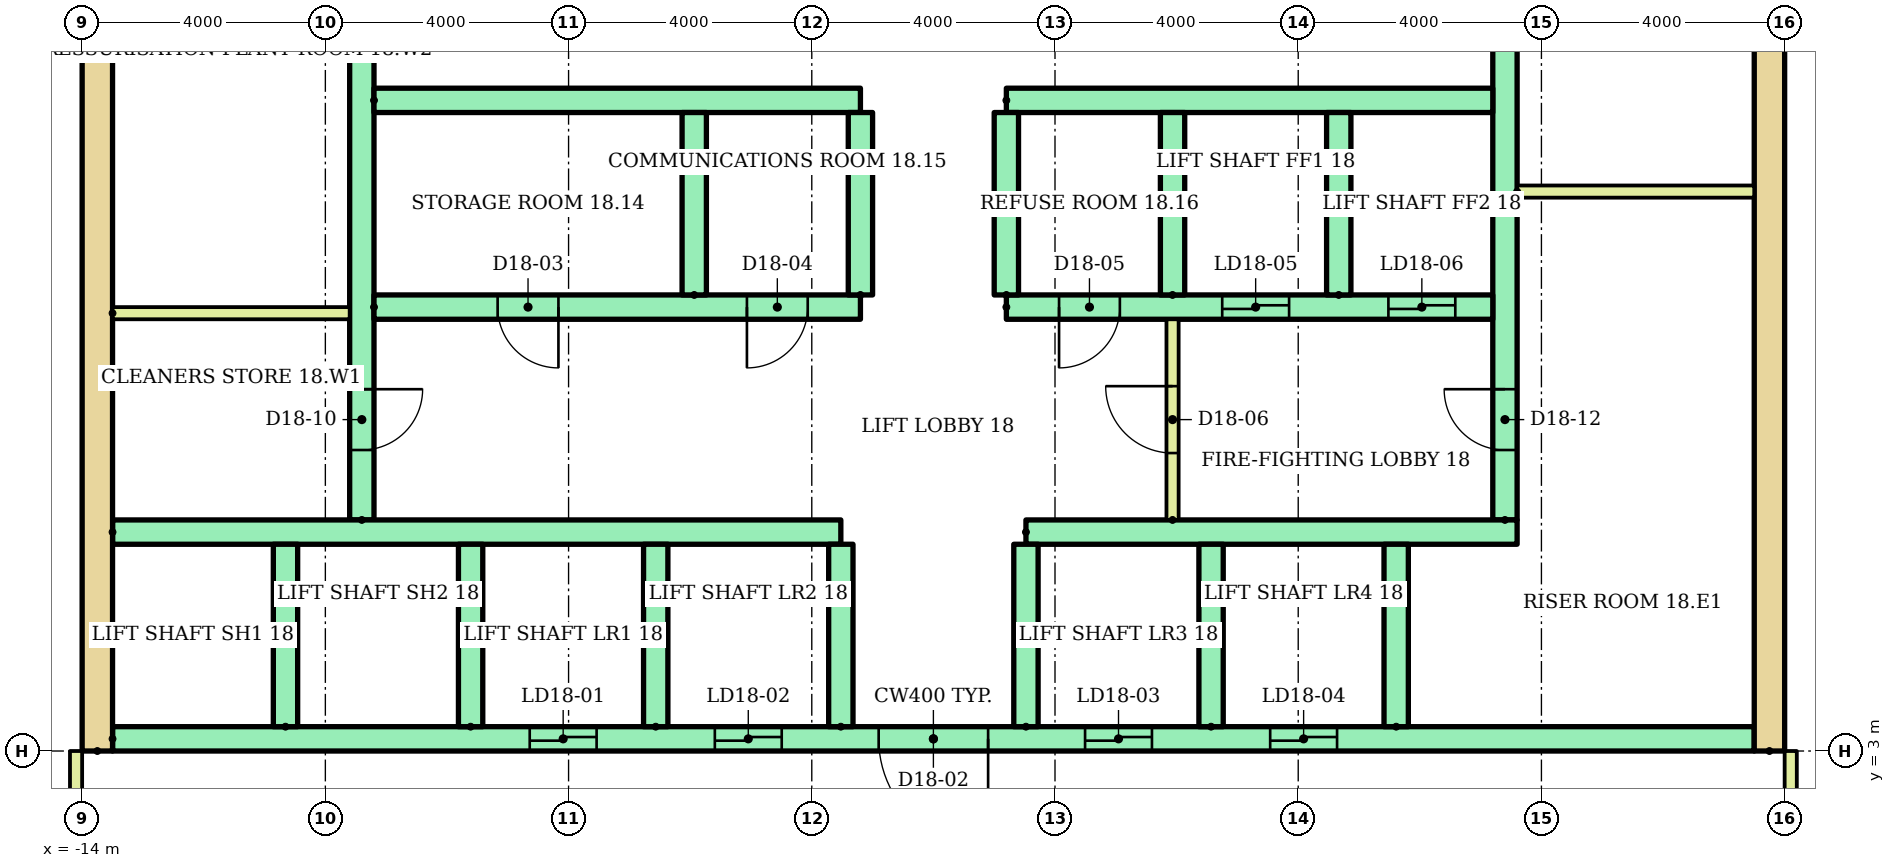
"""IFC4 building model, lengths in metres.
Left out: names, types, materials, properties, quantities, classifications, styles, units other than length and angle.
Written with IfcOpenShell. Run it as: python <this file> out.ifc"""

import sys

from ifc_helpers import new_model, si_unit, direction, frame, frame_2d, origin, place, context, subcontext, project, spatial, rectangle, extrude, element, fill, save


model = new_model("IFC4")
c1 = context("Model", 3, precision=1e-05, world=origin(), true_north=direction((0.0, 1.0)))
c2 = subcontext(c1, "Body", "Model", "MODEL_VIEW")
j1 = project(units=[si_unit("LENGTHUNIT", "METRE"), si_unit("PLANEANGLEUNIT", "RADIAN")], contexts=[c1])
p1 = place(None, origin())
s1 = spatial("IfcSite", under=j1, at=p1, CompositionType="ELEMENT")
p2 = place(p1, origin())
s2 = spatial("IfcBuilding", under=s1, at=p2, CompositionType="ELEMENT")
p3 = place(p2, frame((0.0, 0.0, 73.6)))
s3 = spatial("IfcBuildingStorey", under=s2, at=p3, CompositionType="ELEMENT", Elevation=73.6)
for number, where, z_axis, x_axis in (
    (1, (-13.75, 3.0, 0.0), (0.0, 0.0, 1.0), (0.0, 1.0, 0.0)),
    (2, (13.75, 3.0, 0.0), (0.0, 0.0, 1.0), (0.0, 1.0, 0.0)),
):
    element("IfcWall", number, at=place(p3, frame(where, z_axis=z_axis, x_axis=x_axis)), inside=s3, PredefinedType="SHEAR", context=c2, shape_type="SweptSolid", body=[
        extrude(rectangle(XDim=17.0, YDim=0.5, at=frame_2d((8.5, 0.0))), origin(), (0.0, 0.0, 1.0), 3.62),
    ])
p4 = place(p3, frame((-9.4, 6.8, 0.0), z_axis=(0.0, 0.0, 1.0), x_axis=(0.0, 1.0, 0.0)))
e3 = element("IfcWall", 3, at=p4, inside=s3, PredefinedType="SHEAR", context=c2, shape_type="SweptSolid", body=[
    extrude(rectangle(XDim=12.7, YDim=0.4, at=frame_2d((6.35, 0.0))), origin(), (0.0, 0.0, 1.0), 3.62),
])
p5 = place(p4, frame((1.15, 0.0, 0.0)))
e4 = element("IfcOpeningElement", 4, at=p5, cuts=e3, PredefinedType="OPENING", context=c2, shape_type="SweptSolid", body=[
    extrude(rectangle(XDim=1.0, YDim=2.1, at=frame_2d((0.5, 1.05))), frame((0.0, 0.21, 0.0), z_axis=(0.0, -1.0, 0.0), x_axis=(1.0, 0.0, 0.0)), (0.0, 0.0, 1.0), 0.42),
])
p6 = place(p4, frame((7.925, 0.0, 0.0)))
e5 = element("IfcOpeningElement", 5, at=p6, cuts=e3, PredefinedType="OPENING", context=c2, shape_type="SweptSolid", body=[
    extrude(rectangle(XDim=1.0, YDim=2.1, at=frame_2d((0.5, 1.05))), frame((0.0, 0.21, 0.0), z_axis=(0.0, -1.0, 0.0), x_axis=(1.0, 0.0, 0.0)), (0.0, 0.0, 1.0), 0.42),
])
p7 = place(p3, frame((9.4, 6.8, 0.0), z_axis=(0.0, 0.0, 1.0), x_axis=(0.0, 1.0, 0.0)))
e6 = element("IfcWall", 6, at=p7, inside=s3, PredefinedType="SHEAR", context=c2, shape_type="SweptSolid", body=[
    extrude(rectangle(XDim=12.7, YDim=0.4, at=frame_2d((6.35, 0.0))), origin(), (0.0, 0.0, 1.0), 3.62),
])
p8 = place(p7, frame((1.15, 0.0, 0.0)))
e7 = element("IfcOpeningElement", 7, at=p8, cuts=e6, PredefinedType="OPENING", context=c2, shape_type="SweptSolid", body=[
    extrude(rectangle(XDim=1.0, YDim=2.1, at=frame_2d((0.5, 1.05))), frame((0.0, 0.21, 0.0), z_axis=(0.0, -1.0, 0.0), x_axis=(1.0, 0.0, 0.0)), (0.0, 0.0, 1.0), 0.42),
])
p9 = place(p7, frame((7.925, 0.0, 0.0)))
e8 = element("IfcOpeningElement", 8, at=p9, cuts=e6, PredefinedType="OPENING", context=c2, shape_type="SweptSolid", body=[
    extrude(rectangle(XDim=1.0, YDim=2.1, at=frame_2d((0.5, 1.05))), frame((0.0, 0.21, 0.0), z_axis=(0.0, -1.0, 0.0), x_axis=(1.0, 0.0, 0.0)), (0.0, 0.0, 1.0), 0.42),
])
p10 = place(p3, frame((-13.5, 3.2, 0.0)))
e9 = element("IfcWall", 9, at=p10, inside=s3, PredefinedType="SHEAR", context=c2, shape_type="SweptSolid", body=[
    extrude(rectangle(XDim=27.0, YDim=0.4, at=frame_2d((13.5, 0.0))), origin(), (0.0, 0.0, 1.0), 3.62),
])
p11 = place(p10, frame((6.861, 0.0, 0.0)))
e10 = element("IfcOpeningElement", 10, at=p11, cuts=e9, PredefinedType="OPENING", context=c2, shape_type="SweptSolid", body=[
    extrude(rectangle(XDim=1.1, YDim=2.1, at=frame_2d((0.55, 1.05))), frame((0.0, 0.21, 0.0), z_axis=(0.0, -1.0, 0.0), x_axis=(1.0, 0.0, 0.0)), (0.0, 0.0, 1.0), 0.42),
])
p12 = place(p10, frame((9.906, 0.0, 0.0)))
e11 = element("IfcOpeningElement", 11, at=p12, cuts=e9, PredefinedType="OPENING", context=c2, shape_type="SweptSolid", body=[
    extrude(rectangle(XDim=1.1, YDim=2.1, at=frame_2d((0.55, 1.05))), frame((0.0, 0.21, 0.0), z_axis=(0.0, -1.0, 0.0), x_axis=(1.0, 0.0, 0.0)), (0.0, 0.0, 1.0), 0.42),
])
p13 = place(p10, frame((15.994, 0.0, 0.0)))
e12 = element("IfcOpeningElement", 12, at=p13, cuts=e9, PredefinedType="OPENING", context=c2, shape_type="SweptSolid", body=[
    extrude(rectangle(XDim=1.1, YDim=2.1, at=frame_2d((0.55, 1.05))), frame((0.0, 0.21, 0.0), z_axis=(0.0, -1.0, 0.0), x_axis=(1.0, 0.0, 0.0)), (0.0, 0.0, 1.0), 0.42),
])
p14 = place(p10, frame((19.039, 0.0, 0.0)))
e13 = element("IfcOpeningElement", 13, at=p14, cuts=e9, PredefinedType="OPENING", context=c2, shape_type="SweptSolid", body=[
    extrude(rectangle(XDim=1.1, YDim=2.1, at=frame_2d((0.55, 1.05))), frame((0.0, 0.21, 0.0), z_axis=(0.0, -1.0, 0.0), x_axis=(1.0, 0.0, 0.0)), (0.0, 0.0, 1.0), 0.42),
])
p15 = place(p10, frame((12.6, 0.0, 0.0)))
e14 = element("IfcOpeningElement", 14, at=p15, cuts=e9, PredefinedType="OPENING", context=c2, shape_type="SweptSolid", body=[
    extrude(rectangle(XDim=1.8, YDim=2.1, at=frame_2d((0.9, 1.05))), frame((0.0, 0.21, 0.0), z_axis=(0.0, -1.0, 0.0), x_axis=(1.0, 0.0, 0.0)), (0.0, 0.0, 1.0), 0.42),
])
p16 = place(p3, frame((-13.5, 6.6, 0.0)))
e15 = element("IfcWall", 15, at=p16, inside=s3, PredefinedType="SHEAR", context=c2, shape_type="SweptSolid", body=[
    extrude(rectangle(XDim=11.978, YDim=0.4, at=frame_2d((5.989, 0.0))), origin(), (0.0, 0.0, 1.0), 3.62),
])
p17 = place(p3, frame((1.522, 6.6, 0.0)))
e16 = element("IfcWall", 16, at=p17, inside=s3, PredefinedType="SHEAR", context=c2, shape_type="SweptSolid", body=[
    extrude(rectangle(XDim=8.078, YDim=0.4, at=frame_2d((4.039, 0.0))), origin(), (0.0, 0.0, 1.0), 3.62),
])
for number, where, z_axis, x_axis in (
    (17, (-10.656, 3.4, 0.0), (0.0, 0.0, 1.0), (0.0, 1.0, 0.0)),
    (18, (-7.611, 3.4, 0.0), (0.0, 0.0, 1.0), (0.0, 1.0, 0.0)),
    (19, (-4.567, 3.4, 0.0), (0.0, 0.0, 1.0), (0.0, 1.0, 0.0)),
    (20, (-1.522, 3.4, 0.0), (0.0, 0.0, 1.0), (0.0, 1.0, 0.0)),
    (21, (1.522, 3.4, 0.0), (0.0, 0.0, 1.0), (0.0, 1.0, 0.0)),
    (22, (4.567, 3.4, 0.0), (0.0, 0.0, 1.0), (0.0, 1.0, 0.0)),
    (23, (7.611, 3.4, 0.0), (0.0, 0.0, 1.0), (0.0, 1.0, 0.0)),
):
    element("IfcWall", number, at=place(p3, frame(where, z_axis=z_axis, x_axis=x_axis)), inside=s3, PredefinedType="SHEAR", context=c2, shape_type="SweptSolid", body=[
        extrude(rectangle(XDim=3.0, YDim=0.4, at=frame_2d((1.5, 0.0))), origin(), (0.0, 0.0, 1.0), 3.62),
    ])
p18 = place(p3, frame((-9.2, 10.3, 0.0)))
e24 = element("IfcWall", 24, at=p18, inside=s3, PredefinedType="SHEAR", context=c2, shape_type="SweptSolid", body=[
    extrude(rectangle(XDim=8.0, YDim=0.4, at=frame_2d((4.0, 0.0))), origin(), (0.0, 0.0, 1.0), 3.62),
])
p19 = place(p18, frame((2.033, 0.0, 0.0)))
e25 = element("IfcOpeningElement", 25, at=p19, cuts=e24, PredefinedType="OPENING", context=c2, shape_type="SweptSolid", body=[
    extrude(rectangle(XDim=1.0, YDim=2.1, at=frame_2d((0.5, 1.05))), frame((0.0, 0.21, 0.0), z_axis=(0.0, -1.0, 0.0), x_axis=(1.0, 0.0, 0.0)), (0.0, 0.0, 1.0), 0.42),
])
p20 = place(p18, frame((6.133, 0.0, 0.0)))
e26 = element("IfcOpeningElement", 26, at=p20, cuts=e24, PredefinedType="OPENING", context=c2, shape_type="SweptSolid", body=[
    extrude(rectangle(XDim=1.0, YDim=2.1, at=frame_2d((0.5, 1.05))), frame((0.0, 0.21, 0.0), z_axis=(0.0, -1.0, 0.0), x_axis=(1.0, 0.0, 0.0)), (0.0, 0.0, 1.0), 0.42),
])
p21 = place(p3, frame((-9.2, 13.7, 0.0)))
e27 = element("IfcWall", 27, at=p21, inside=s3, PredefinedType="SHEAR", context=c2, shape_type="SweptSolid", body=[
    extrude(rectangle(XDim=8.0, YDim=0.4, at=frame_2d((4.0, 0.0))), origin(), (0.0, 0.0, 1.0), 3.62),
])
p22 = place(p3, frame((1.2, 10.3, 0.0)))
e28 = element("IfcWall", 28, at=p22, inside=s3, PredefinedType="SHEAR", context=c2, shape_type="SweptSolid", body=[
    extrude(rectangle(XDim=8.0, YDim=0.4, at=frame_2d((4.0, 0.0))), origin(), (0.0, 0.0, 1.0), 3.62),
])
p23 = place(p22, frame((3.55, 0.0, 0.0)))
e29 = element("IfcOpeningElement", 29, at=p23, cuts=e28, PredefinedType="OPENING", context=c2, shape_type="SweptSolid", body=[
    extrude(rectangle(XDim=1.1, YDim=2.1, at=frame_2d((0.55, 1.05))), frame((0.0, 0.21, 0.0), z_axis=(0.0, -1.0, 0.0), x_axis=(1.0, 0.0, 0.0)), (0.0, 0.0, 1.0), 0.42),
])
p24 = place(p22, frame((6.283, 0.0, 0.0)))
e30 = element("IfcOpeningElement", 30, at=p24, cuts=e28, PredefinedType="OPENING", context=c2, shape_type="SweptSolid", body=[
    extrude(rectangle(XDim=1.1, YDim=2.1, at=frame_2d((0.55, 1.05))), frame((0.0, 0.21, 0.0), z_axis=(0.0, -1.0, 0.0), x_axis=(1.0, 0.0, 0.0)), (0.0, 0.0, 1.0), 0.42),
])
p25 = place(p22, frame((0.867, 0.0, 0.0)))
e31 = element("IfcOpeningElement", 31, at=p25, cuts=e28, PredefinedType="OPENING", context=c2, shape_type="SweptSolid", body=[
    extrude(rectangle(XDim=1.0, YDim=2.1, at=frame_2d((0.5, 1.05))), frame((0.0, 0.21, 0.0), z_axis=(0.0, -1.0, 0.0), x_axis=(1.0, 0.0, 0.0)), (0.0, 0.0, 1.0), 0.42),
])
p26 = place(p3, frame((1.2, 13.7, 0.0)))
e32 = element("IfcWall", 32, at=p26, inside=s3, PredefinedType="SHEAR", context=c2, shape_type="SweptSolid", body=[
    extrude(rectangle(XDim=8.0, YDim=0.4, at=frame_2d((4.0, 0.0))), origin(), (0.0, 0.0, 1.0), 3.62),
])
for number, where, z_axis, x_axis in (
    (33, (-3.933, 10.5, 0.0), (0.0, 0.0, 1.0), (0.0, 1.0, 0.0)),
    (34, (-1.2, 10.5, 0.0), (0.0, 0.0, 1.0), (0.0, 1.0, 0.0)),
    (35, (1.2, 10.5, 0.0), (0.0, 0.0, 1.0), (0.0, 1.0, 0.0)),
    (36, (3.933, 10.5, 0.0), (0.0, 0.0, 1.0), (0.0, 1.0, 0.0)),
    (37, (6.667, 10.5, 0.0), (0.0, 0.0, 1.0), (0.0, 1.0, 0.0)),
):
    element("IfcWall", number, at=place(p3, frame(where, z_axis=z_axis, x_axis=x_axis)), inside=s3, PredefinedType="SHEAR", context=c2, shape_type="SweptSolid", body=[
        extrude(rectangle(XDim=3.0, YDim=0.4, at=frame_2d((1.5, 0.0))), origin(), (0.0, 0.0, 1.0), 3.62),
    ])
p27 = place(p3, frame((3.933, 6.8, 0.0), z_axis=(0.0, 0.0, 1.0), x_axis=(0.0, 1.0, 0.0)))
e38 = element("IfcWall", 38, at=p27, inside=s3, PredefinedType="PARTITIONING", context=c2, shape_type="SweptSolid", body=[
    extrude(rectangle(XDim=3.3, YDim=0.2, at=frame_2d((1.65, 0.0))), origin(), (0.0, 0.0, 1.0), 3.62),
])
p28 = place(p27, frame((1.1, 0.0, 0.0)))
e39 = element("IfcOpeningElement", 39, at=p28, cuts=e38, PredefinedType="OPENING", context=c2, shape_type="SweptSolid", body=[
    extrude(rectangle(XDim=1.1, YDim=2.1, at=frame_2d((0.55, 1.05))), frame((0.0, 0.11, 0.0), z_axis=(0.0, -1.0, 0.0), x_axis=(1.0, 0.0, 0.0)), (0.0, 0.0, 1.0), 0.22),
])
for number, where in (
    (40, (-13.5, 10.2, 0.0)),
    (41, (9.6, 12.2, 0.0)),
):
    element("IfcWall", number, at=place(p3, frame(where)), inside=s3, PredefinedType="PARTITIONING", context=c2, shape_type="SweptSolid", body=[
        extrude(rectangle(XDim=3.9, YDim=0.2, at=frame_2d((1.95, 0.0))), origin(), (0.0, 0.0, 1.0), 3.62),
    ])
for number, where, z_axis, x_axis in (
    (42, (-14.1, 1.5, 0.0), (0.0, 0.0, 1.0), (0.0, 1.0, 0.0)),
    (43, (14.1, 1.5, 0.0), (0.0, 0.0, 1.0), (0.0, 1.0, 0.0)),
):
    element("IfcWall", number, at=place(p3, frame(where, z_axis=z_axis, x_axis=x_axis)), inside=s3, PredefinedType="PARTITIONING", context=c2, shape_type="SweptSolid", body=[
        extrude(rectangle(XDim=1.5, YDim=0.2, at=frame_2d((0.75, 0.0))), origin(), (0.0, 0.0, 1.0), 3.62),
    ])
p29 = place(p11, origin())
e44 = element("IfcDoor", 44, at=p29, inside=s3, OperationType="SLIDING_TO_LEFT", PredefinedType="DOOR", context=c2, shape_type="SweptSolid", body=[
    extrude(rectangle(XDim=1.1, YDim=2.1, at=frame_2d((0.55, 1.05))), frame((0.0, 0.025, 0.0), z_axis=(0.0, -1.0, 0.0), x_axis=(1.0, 0.0, 0.0)), (0.0, 0.0, 1.0), 0.05),
])
fill(e10, e44)
p30 = place(p12, origin())
e45 = element("IfcDoor", 45, at=p30, inside=s3, OperationType="SLIDING_TO_LEFT", PredefinedType="DOOR", context=c2, shape_type="SweptSolid", body=[
    extrude(rectangle(XDim=1.1, YDim=2.1, at=frame_2d((0.55, 1.05))), frame((0.0, 0.025, 0.0), z_axis=(0.0, -1.0, 0.0), x_axis=(1.0, 0.0, 0.0)), (0.0, 0.0, 1.0), 0.05),
])
fill(e11, e45)
p31 = place(p13, origin())
e46 = element("IfcDoor", 46, at=p31, inside=s3, OperationType="SLIDING_TO_LEFT", PredefinedType="DOOR", context=c2, shape_type="SweptSolid", body=[
    extrude(rectangle(XDim=1.1, YDim=2.1, at=frame_2d((0.55, 1.05))), frame((0.0, 0.025, 0.0), z_axis=(0.0, -1.0, 0.0), x_axis=(1.0, 0.0, 0.0)), (0.0, 0.0, 1.0), 0.05),
])
fill(e12, e46)
p32 = place(p14, origin())
e47 = element("IfcDoor", 47, at=p32, inside=s3, OperationType="SLIDING_TO_LEFT", PredefinedType="DOOR", context=c2, shape_type="SweptSolid", body=[
    extrude(rectangle(XDim=1.1, YDim=2.1, at=frame_2d((0.55, 1.05))), frame((0.0, 0.025, 0.0), z_axis=(0.0, -1.0, 0.0), x_axis=(1.0, 0.0, 0.0)), (0.0, 0.0, 1.0), 0.05),
])
fill(e13, e47)
p33 = place(p15, frame((1.8, 0.0, 0.0), z_axis=(0.0, 0.0, 1.0), x_axis=(-1.0, 0.0, 0.0)))
e48 = element("IfcDoor", 48, at=p33, inside=s3, OperationType="DOUBLE_DOOR_SINGLE_SWING", PredefinedType="DOOR", context=c2, shape_type="SweptSolid", body=[
    extrude(rectangle(XDim=1.8, YDim=2.1, at=frame_2d((0.9, 1.05))), frame((0.0, 0.025, 0.0), z_axis=(0.0, -1.0, 0.0), x_axis=(1.0, 0.0, 0.0)), (0.0, 0.0, 1.0), 0.05),
])
fill(e14, e48)
p34 = place(p23, origin())
e49 = element("IfcDoor", 49, at=p34, inside=s3, OperationType="SLIDING_TO_LEFT", PredefinedType="DOOR", context=c2, shape_type="SweptSolid", body=[
    extrude(rectangle(XDim=1.1, YDim=2.1, at=frame_2d((0.55, 1.05))), frame((0.0, 0.025, 0.0), z_axis=(0.0, -1.0, 0.0), x_axis=(1.0, 0.0, 0.0)), (0.0, 0.0, 1.0), 0.05),
])
fill(e29, e49)
p35 = place(p24, origin())
e50 = element("IfcDoor", 50, at=p35, inside=s3, OperationType="SLIDING_TO_LEFT", PredefinedType="DOOR", context=c2, shape_type="SweptSolid", body=[
    extrude(rectangle(XDim=1.1, YDim=2.1, at=frame_2d((0.55, 1.05))), frame((0.0, 0.025, 0.0), z_axis=(0.0, -1.0, 0.0), x_axis=(1.0, 0.0, 0.0)), (0.0, 0.0, 1.0), 0.05),
])
fill(e30, e50)
p36 = place(p19, frame((1.0, 0.0, 0.0), z_axis=(0.0, 0.0, 1.0), x_axis=(-1.0, 0.0, 0.0)))
e51 = element("IfcDoor", 51, at=p36, inside=s3, OperationType="SINGLE_SWING_RIGHT", PredefinedType="DOOR", context=c2, shape_type="SweptSolid", body=[
    extrude(rectangle(XDim=1.0, YDim=2.1, at=frame_2d((0.5, 1.05))), frame((0.0, 0.025, 0.0), z_axis=(0.0, -1.0, 0.0), x_axis=(1.0, 0.0, 0.0)), (0.0, 0.0, 1.0), 0.05),
])
fill(e25, e51)
p37 = place(p20, frame((1.0, 0.0, 0.0), z_axis=(0.0, 0.0, 1.0), x_axis=(-1.0, 0.0, 0.0)))
e52 = element("IfcDoor", 52, at=p37, inside=s3, OperationType="SINGLE_SWING_LEFT", PredefinedType="DOOR", context=c2, shape_type="SweptSolid", body=[
    extrude(rectangle(XDim=1.0, YDim=2.1, at=frame_2d((0.5, 1.05))), frame((0.0, 0.025, 0.0), z_axis=(0.0, -1.0, 0.0), x_axis=(1.0, 0.0, 0.0)), (0.0, 0.0, 1.0), 0.05),
])
fill(e26, e52)
p38 = place(p25, frame((1.0, 0.0, 0.0), z_axis=(0.0, 0.0, 1.0), x_axis=(-1.0, 0.0, 0.0)))
e53 = element("IfcDoor", 53, at=p38, inside=s3, OperationType="SINGLE_SWING_LEFT", PredefinedType="DOOR", context=c2, shape_type="SweptSolid", body=[
    extrude(rectangle(XDim=1.0, YDim=2.1, at=frame_2d((0.5, 1.05))), frame((0.0, 0.025, 0.0), z_axis=(0.0, -1.0, 0.0), x_axis=(1.0, 0.0, 0.0)), (0.0, 0.0, 1.0), 0.05),
])
fill(e31, e53)
p39 = place(p28, origin())
e54 = element("IfcDoor", 54, at=p39, inside=s3, OperationType="SINGLE_SWING_RIGHT", PredefinedType="DOOR", context=c2, shape_type="SweptSolid", body=[
    extrude(rectangle(XDim=1.1, YDim=2.1, at=frame_2d((0.55, 1.05))), frame((0.0, 0.025, 0.0), z_axis=(0.0, -1.0, 0.0), x_axis=(1.0, 0.0, 0.0)), (0.0, 0.0, 1.0), 0.05),
])
fill(e39, e54)
p40 = place(p5, frame((1.0, 0.0, 0.0), z_axis=(0.0, 0.0, 1.0), x_axis=(-1.0, 0.0, 0.0)))
e55 = element("IfcDoor", 55, at=p40, inside=s3, OperationType="SINGLE_SWING_RIGHT", PredefinedType="DOOR", context=c2, shape_type="SweptSolid", body=[
    extrude(rectangle(XDim=1.0, YDim=2.1, at=frame_2d((0.5, 1.05))), frame((0.0, 0.025, 0.0), z_axis=(0.0, -1.0, 0.0), x_axis=(1.0, 0.0, 0.0)), (0.0, 0.0, 1.0), 0.05),
])
fill(e4, e55)
p41 = place(p8, origin())
e56 = element("IfcDoor", 56, at=p41, inside=s3, OperationType="SINGLE_SWING_RIGHT", PredefinedType="DOOR", context=c2, shape_type="SweptSolid", body=[
    extrude(rectangle(XDim=1.0, YDim=2.1, at=frame_2d((0.5, 1.05))), frame((0.0, 0.025, 0.0), z_axis=(0.0, -1.0, 0.0), x_axis=(1.0, 0.0, 0.0)), (0.0, 0.0, 1.0), 0.05),
])
fill(e7, e56)
save(model, sys.argv[1])
